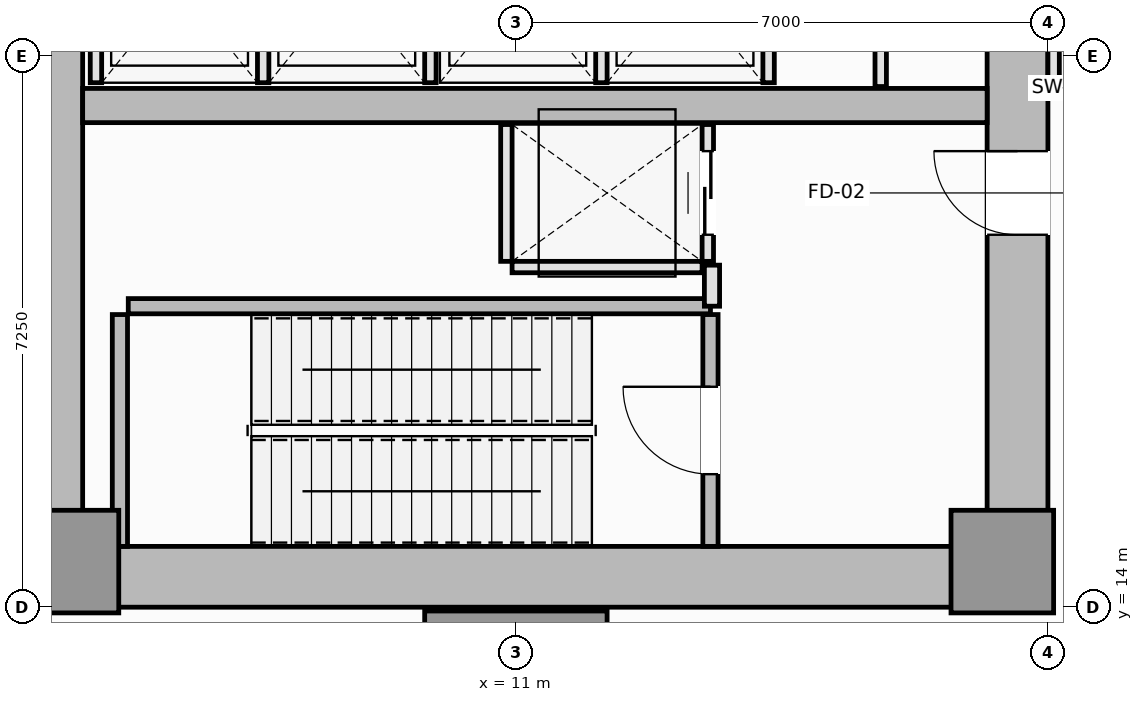
"""IFC4 building model, lengths in metres.
Left out: names, types, materials, properties, quantities, classifications, styles, units other than length and angle.
Written with IfcOpenShell. Run it as: python <this file> out.ifc"""

import sys

from ifc_helpers import new_model, si_unit, direction, frame, frame_2d, origin, origin_2d, place, context, subcontext, project, spatial, rectangle, extrude, element, fill, save


model = new_model("IFC4")
c1 = context("Model", 3, precision=1e-05, world=origin(), true_north=direction((0.0, 1.0)))
c2 = subcontext(c1, "Body", "Model", "MODEL_VIEW")
j1 = project(units=[si_unit("LENGTHUNIT", "METRE"), si_unit("PLANEANGLEUNIT", "RADIAN")], contexts=[c1])
p1 = place(None, origin())
s1 = spatial("IfcSite", under=j1, at=p1, CompositionType="ELEMENT")
p2 = place(p1, origin())
s2 = spatial("IfcBuilding", under=s1, at=p2, CompositionType="ELEMENT")
p3 = place(p2, origin())
s3 = spatial("IfcBuildingStorey", under=s2, at=p3, CompositionType="ELEMENT", Elevation=0.0)
p4 = place(p3, frame((4.5, 14.4, 0.0), z_axis=(0.0, 0.0, 1.0), x_axis=(1.0, 0.0, 0.0)))
e1 = element("IfcWall", 1, at=p4, inside=s3, PredefinedType="SHEAR", context=c2, shape_type="SweptSolid", body=[
    extrude(rectangle(XDim=13.5, YDim=0.8, at=frame_2d((6.75, 0.0))), origin(), (0.0, 0.0, 1.0), 6.0),
])
p5 = place(p3, frame((4.9, 14.8, 0.0), z_axis=(0.0, 0.0, 1.0), x_axis=(0.0, 1.0, 0.0)))
e2 = element("IfcWall", 2, at=p5, inside=s3, PredefinedType="SHEAR", context=c2, shape_type="SweptSolid", body=[
    extrude(rectangle(XDim=20.9, YDim=0.8, at=frame_2d((10.45, 0.0))), origin(), (0.0, 0.0, 1.0), 6.0),
])
p6 = place(p3, frame((17.6, 14.8, 0.0), z_axis=(0.0, 0.0, 1.0), x_axis=(0.0, 1.0, 0.0)))
e3 = element("IfcWall", 3, at=p6, inside=s3, PredefinedType="SHEAR", context=c2, shape_type="SweptSolid", body=[
    extrude(rectangle(XDim=8.65, YDim=0.8, at=frame_2d((4.325, 0.0))), origin(), (0.0, 0.0, 1.0), 6.0),
])
p7 = place(p6, frame((4.1, 0.0, 0.0)))
e4 = element("IfcOpeningElement", 4, at=p7, cuts=e3, PredefinedType="OPENING", context=c2, shape_type="SweptSolid", body=[
    extrude(rectangle(XDim=1.1, YDim=2.15, at=frame_2d((0.55, 1.075))), frame((0.0, 0.41, 0.0), z_axis=(0.0, -1.0, 0.0), x_axis=(1.0, 0.0, 0.0)), (0.0, 0.0, 1.0), 0.82),
])
p8 = place(p3, frame((5.3, 20.6, 0.0), z_axis=(0.0, 0.0, 1.0), x_axis=(1.0, 0.0, 0.0)))
e5 = element("IfcWall", 5, at=p8, inside=s3, PredefinedType="SHEAR", context=c2, shape_type="SweptSolid", body=[
    extrude(rectangle(XDim=11.9, YDim=0.45, at=frame_2d((5.95, 0.0))), origin(), (0.0, 0.0, 1.0), 6.0),
])
for number, where, z_axis, x_axis in (
    (6, (5.1, 14.6, 0.0), (0.0, 0.0, 1.0), (1.0, 0.0, 0.0)),
    (7, (17.4, 14.6, 0.0), (0.0, 0.0, 1.0), (1.0, 0.0, 0.0)),
):
    element("IfcColumn", number, at=place(p3, frame(where, z_axis=z_axis, x_axis=x_axis)), inside=s3, PredefinedType="PILASTER", context=c2, shape_type="SweptSolid", body=[
        extrude(rectangle(XDim=1.35, YDim=1.35, at=origin_2d()), origin(), (0.0, 0.0, 1.0), 6.0),
    ])
p9 = place(p3, frame((11.0, 12.75, 0.0), z_axis=(0.0, 0.0, 1.0), x_axis=(1.0, 0.0, 0.0)))
e8 = element("IfcColumn", 8, at=p9, inside=s3, PredefinedType="COLUMN", context=c2, shape_type="SweptSolid", body=[
    extrude(rectangle(XDim=2.4, YDim=2.4, at=origin_2d()), origin(), (0.0, 0.0, 1.0), 6.0),
])
p10 = place(p3, frame((5.79, 14.8, 0.0), z_axis=(0.0, 0.0, 1.0), x_axis=(0.0, 1.0, 0.0)))
e9 = element("IfcWall", 9, at=p10, inside=s3, PredefinedType="SOLIDWALL", context=c2, shape_type="SweptSolid", body=[
    extrude(rectangle(XDim=3.05, YDim=0.2, at=frame_2d((1.525, 0.0))), origin(), (0.0, 0.0, 1.0), 6.0),
])
p11 = place(p3, frame((5.9, 17.96, 0.0), z_axis=(0.0, 0.0, 1.0), x_axis=(1.0, 0.0, 0.0)))
e10 = element("IfcWall", 10, at=p11, inside=s3, PredefinedType="SOLIDWALL", context=c2, shape_type="SweptSolid", body=[
    extrude(rectangle(XDim=7.66, YDim=0.2, at=frame_2d((3.83, 0.0))), origin(), (0.0, 0.0, 1.0), 6.0),
])
p12 = place(p3, frame((13.56, 14.8, 0.0), z_axis=(0.0, 0.0, 1.0), x_axis=(0.0, 1.0, 0.0)))
e11 = element("IfcWall", 11, at=p12, inside=s3, PredefinedType="SOLIDWALL", context=c2, shape_type="SweptSolid", body=[
    extrude(rectangle(XDim=3.05, YDim=0.2, at=frame_2d((1.525, 0.0))), origin(), (0.0, 0.0, 1.0), 6.0),
])
p13 = place(p12, frame((0.95, 0.0, 0.0)))
e12 = element("IfcOpeningElement", 12, at=p13, cuts=e11, PredefinedType="OPENING", context=c2, shape_type="SweptSolid", body=[
    extrude(rectangle(XDim=1.15, YDim=2.15, at=frame_2d((0.575, 1.075))), frame((0.0, 0.11, 0.0), z_axis=(0.0, -1.0, 0.0), x_axis=(1.0, 0.0, 0.0)), (0.0, 0.0, 1.0), 0.22),
])
p14 = place(p3, frame((18.15, 20.825, 0.0), z_axis=(0.0, 0.0, 1.0), x_axis=(1.0, 0.0, 0.0)))
e13 = element("IfcWall", 13, at=p14, inside=s3, PredefinedType="PARTITIONING", context=c2, shape_type="SweptSolid", body=[
    extrude(rectangle(XDim=2.05, YDim=0.15, at=frame_2d((1.025, 0.0))), origin(), (0.0, 0.0, 1.0), 5.8),
])
for number, where, z_axis, x_axis in (
    (14, (18.075, 20.9, 0.0), (0.0, 0.0, 1.0), (0.0, 1.0, 0.0)),
    (15, (5.475, 20.9, 0.0), (0.0, 0.0, 1.0), (0.0, 1.0, 0.0)),
    (16, (7.675, 20.9, 0.0), (0.0, 0.0, 1.0), (0.0, 1.0, 0.0)),
    (17, (9.875, 20.9, 0.0), (0.0, 0.0, 1.0), (0.0, 1.0, 0.0)),
    (18, (12.125, 20.9, 0.0), (0.0, 0.0, 1.0), (0.0, 1.0, 0.0)),
    (19, (14.325, 20.9, 0.0), (0.0, 0.0, 1.0), (0.0, 1.0, 0.0)),
):
    element("IfcWall", number, at=place(p3, frame(where, z_axis=z_axis, x_axis=x_axis)), inside=s3, PredefinedType="PARTITIONING", context=c2, shape_type="SweptSolid", body=[
        extrude(rectangle(XDim=2.55, YDim=0.15, at=frame_2d((1.275, 0.0))), origin(), (0.0, 0.0, 1.0), 5.8),
    ])
p15 = place(p3, frame((10.95, 18.475, 0.0), z_axis=(0.0, 0.0, 1.0), x_axis=(1.0, 0.0, 0.0)))
e20 = element("IfcWall", 20, at=p15, inside=s3, PredefinedType="PARTITIONING", context=c2, shape_type="SweptSolid", body=[
    extrude(rectangle(XDim=2.5, YDim=0.15, at=frame_2d((1.25, 0.0))), origin(), (0.0, 0.0, 1.0), 5.8),
])
p16 = place(p3, frame((10.875, 18.55, 0.0), z_axis=(0.0, 0.0, 1.0), x_axis=(0.0, 1.0, 0.0)))
e21 = element("IfcWall", 21, at=p16, inside=s3, PredefinedType="PARTITIONING", context=c2, shape_type="SweptSolid", body=[
    extrude(rectangle(XDim=1.8, YDim=0.15, at=frame_2d((0.9, 0.0))), origin(), (0.0, 0.0, 1.0), 5.8),
])
p17 = place(p3, frame((13.525, 18.55, 0.0), z_axis=(0.0, 0.0, 1.0), x_axis=(0.0, 1.0, 0.0)))
e22 = element("IfcWall", 22, at=p17, inside=s3, PredefinedType="PARTITIONING", context=c2, shape_type="SweptSolid", body=[
    extrude(rectangle(XDim=1.8, YDim=0.15, at=frame_2d((0.9, 0.0))), origin(), (0.0, 0.0, 1.0), 5.8),
])
p18 = place(p17, frame((0.35, 0.0, 0.0)))
e23 = element("IfcOpeningElement", 23, at=p18, cuts=e22, PredefinedType="OPENING", context=c2, shape_type="SweptSolid", body=[
    extrude(rectangle(XDim=1.1, YDim=2.2, at=frame_2d((0.55, 1.1))), frame((0.0, 0.085, 0.0), z_axis=(0.0, -1.0, 0.0), x_axis=(1.0, 0.0, 0.0)), (0.0, 0.0, 1.0), 0.17),
])
p19 = place(p3, frame((13.58, 17.96, 0.0), z_axis=(0.0, 0.0, 1.0), x_axis=(0.0, 1.0, 0.0)))
e24 = element("IfcWall", 24, at=p19, inside=s3, PredefinedType="PARTITIONING", context=c2, shape_type="SweptSolid", body=[
    extrude(rectangle(XDim=0.54, YDim=0.2, at=frame_2d((0.27, 0.0))), origin(), (0.0, 0.0, 1.0), 5.8),
])
p20 = place(p3, frame((15.8, 20.85, 0.0), z_axis=(0.0, 0.0, 1.0), x_axis=(0.0, 1.0, 0.0)))
e25 = element("IfcWall", 25, at=p20, inside=s3, PredefinedType="PARTITIONING", context=c2, shape_type="SweptSolid", body=[
    extrude(rectangle(XDim=2.67, YDim=0.15, at=frame_2d((1.335, 0.0))), origin(), (0.0, 0.0, 1.0), 5.8),
])
p21 = place(p13, origin())
e26 = element("IfcDoor", 26, at=p21, inside=s3, OperationType="SINGLE_SWING_RIGHT", PredefinedType="DOOR", context=c2, shape_type="SweptSolid", body=[
    extrude(rectangle(XDim=1.15, YDim=2.15, at=frame_2d((0.575, 1.075))), frame((0.0, 0.025, 0.0), z_axis=(0.0, -1.0, 0.0), x_axis=(1.0, 0.0, 0.0)), (0.0, 0.0, 1.0), 0.05),
])
fill(e12, e26)
p22 = place(p18, origin())
e27 = element("IfcDoor", 27, at=p22, inside=s3, OperationType="DOUBLE_DOOR_SLIDING", PredefinedType="DOOR", context=c2, shape_type="SweptSolid", body=[
    extrude(rectangle(XDim=1.1, YDim=2.2, at=frame_2d((0.55, 1.1))), frame((0.0, 0.025, 0.0), z_axis=(0.0, -1.0, 0.0), x_axis=(1.0, 0.0, 0.0)), (0.0, 0.0, 1.0), 0.05),
])
fill(e23, e27)
p23 = place(p7, origin())
e28 = element("IfcDoor", 28, at=p23, inside=s3, OperationType="SINGLE_SWING_RIGHT", PredefinedType="DOOR", context=c2, shape_type="SweptSolid", body=[
    extrude(rectangle(XDim=1.1, YDim=2.15, at=frame_2d((0.55, 1.075))), frame((0.0, 0.025, 0.0), z_axis=(0.0, -1.0, 0.0), x_axis=(1.0, 0.0, 0.0)), (0.0, 0.0, 1.0), 0.05),
])
fill(e4, e28)
save(model, sys.argv[1])
